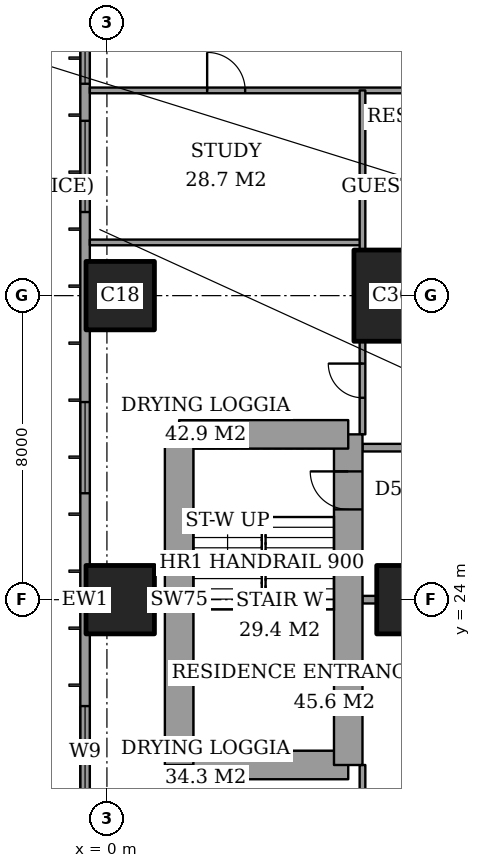
"""IFC4 building model, lengths in metres.
Left out: names, types, materials, properties, quantities, classifications, styles, units other than length and angle.
Written with IfcOpenShell. Run it as: python <this file> out.ifc"""

import sys

from ifc_helpers import new_model, si_unit, direction, frame, frame_2d, origin, origin_2d, place, context, subcontext, project, spatial, rectangle, extrude, element, fill, save


model = new_model("IFC4")
c1 = context("Model", 3, precision=1e-05, world=origin(), true_north=direction((0.0, 1.0)))
c2 = subcontext(c1, "Body", "Model", "MODEL_VIEW")
j1 = project(units=[si_unit("LENGTHUNIT", "METRE"), si_unit("PLANEANGLEUNIT", "RADIAN")], contexts=[c1])
p1 = place(None, origin())
s1 = spatial("IfcSite", under=j1, at=p1, CompositionType="ELEMENT")
p2 = place(p1, origin())
s2 = spatial("IfcBuilding", under=s1, at=p2, CompositionType="ELEMENT")
p3 = place(p2, frame((0.0, 0.0, 193.0)))
s3 = spatial("IfcBuildingStorey", under=s2, at=p3, CompositionType="ELEMENT", Elevation=193.0)
for number, where, z_axis, x_axis in (
    (1, (0.35, 24.0, 0.0), (0.0, 0.0, 1.0), (1.0, 0.0, 0.0)),
    (2, (0.35, 32.0, 0.0), (0.0, 0.0, 1.0), (1.0, 0.0, 0.0)),
    (3, (8.0, 24.0, 0.0), (0.0, 0.0, 1.0), (1.0, 0.0, 0.0)),
):
    element("IfcColumn", number, at=place(p3, frame(where, z_axis=z_axis, x_axis=x_axis)), inside=s3, PredefinedType="COLUMN", context=c2, shape_type="SweptSolid", body=[
        extrude(rectangle(XDim=1.8, YDim=1.8, at=origin_2d()), origin(), (0.0, 0.0, 1.0), 3.6),
    ])
p4 = place(p3, frame((8.0, 32.0, 0.0), z_axis=(0.0, 0.0, 1.0), x_axis=(1.0, 0.0, 0.0)))
e4 = element("IfcColumn", 4, at=p4, inside=s3, PredefinedType="COLUMN", context=c2, shape_type="SweptSolid", body=[
    extrude(rectangle(XDim=3.0, YDim=2.4, at=origin_2d()), origin(), (0.0, 0.0, 1.0), 3.6),
])
p5 = place(p3, frame((1.9, 19.65, 0.0), z_axis=(0.0, 0.0, 1.0), x_axis=(1.0, 0.0, 0.0)))
e5 = element("IfcWall", 5, at=p5, inside=s3, PredefinedType="SHEAR", context=c2, shape_type="SweptSolid", body=[
    extrude(rectangle(XDim=4.45, YDim=0.75, at=frame_2d((2.225, 0.0))), origin(), (0.0, 0.0, 1.0), 3.6),
])
p6 = place(p3, frame((6.35, 19.65, 0.0), z_axis=(0.0, 0.0, 1.0), x_axis=(0.0, 1.0, 0.0)))
e6 = element("IfcWall", 6, at=p6, inside=s3, PredefinedType="SHEAR", context=c2, shape_type="SweptSolid", body=[
    extrude(rectangle(XDim=8.7, YDim=0.75, at=frame_2d((4.35, 0.0))), origin(), (0.0, 0.0, 1.0), 3.6),
])
p7 = place(p6, frame((6.725, 0.0, 0.0)))
e7 = element("IfcOpeningElement", 7, at=p7, cuts=e6, PredefinedType="OPENING", context=c2, shape_type="SweptSolid", body=[
    extrude(rectangle(XDim=1.0, YDim=2.1, at=frame_2d((0.5, 1.05))), frame((0.0, 0.385, 0.0), z_axis=(0.0, -1.0, 0.0), x_axis=(1.0, 0.0, 0.0)), (0.0, 0.0, 1.0), 0.77),
])
p8 = place(p3, frame((6.35, 28.35, 0.0), z_axis=(0.0, 0.0, 1.0), x_axis=(-1.0, 0.0, 0.0)))
e8 = element("IfcWall", 8, at=p8, inside=s3, PredefinedType="SHEAR", context=c2, shape_type="SweptSolid", body=[
    extrude(rectangle(XDim=4.45, YDim=0.75, at=frame_2d((2.225, 0.0))), origin(), (0.0, 0.0, 1.0), 3.6),
])
p9 = place(p3, frame((1.9, 28.35, 0.0), z_axis=(0.0, 0.0, 1.0), x_axis=(0.0, -1.0, 0.0)))
e9 = element("IfcWall", 9, at=p9, inside=s3, PredefinedType="SHEAR", context=c2, shape_type="SweptSolid", body=[
    extrude(rectangle(XDim=8.7, YDim=0.75, at=frame_2d((4.35, 0.0))), origin(), (0.0, 0.0, 1.0), 3.6),
])
p10 = place(p3, frame((-0.575, 44.825, 0.0), z_axis=(0.0, 0.0, 1.0), x_axis=(0.0, -1.0, 0.0)))
e10 = element("IfcWall", 10, at=p10, inside=s3, PredefinedType="SOLIDWALL", context=c2, shape_type="SweptSolid", body=[
    extrude(rectangle(XDim=41.65, YDim=0.25, at=frame_2d((20.825, 0.0))), origin(), (0.0, 0.0, 1.0), 3.6),
])
p11 = place(p10, frame((0.825, 0.0, 0.2)))
e11 = element("IfcOpeningElement", 11, at=p11, cuts=e10, PredefinedType="OPENING", context=c2, shape_type="SweptSolid", body=[
    extrude(rectangle(XDim=2.4, YDim=2.4, at=frame_2d((1.2, 1.2))), frame((0.0, 0.135, 0.0), z_axis=(0.0, -1.0, 0.0), x_axis=(1.0, 0.0, 0.0)), (0.0, 0.0, 1.0), 0.27),
])
p12 = place(p10, frame((6.05, 0.0, 0.2)))
e12 = element("IfcOpeningElement", 12, at=p12, cuts=e10, PredefinedType="OPENING", context=c2, shape_type="SweptSolid", body=[
    extrude(rectangle(XDim=1.2, YDim=2.4, at=frame_2d((0.6, 1.2))), frame((0.0, 0.135, 0.0), z_axis=(0.0, -1.0, 0.0), x_axis=(1.0, 0.0, 0.0)), (0.0, 0.0, 1.0), 0.27),
])
p13 = place(p10, frame((8.225, 0.0, 0.2)))
e13 = element("IfcOpeningElement", 13, at=p13, cuts=e10, PredefinedType="OPENING", context=c2, shape_type="SweptSolid", body=[
    extrude(rectangle(XDim=2.4, YDim=2.4, at=frame_2d((1.2, 1.2))), frame((0.0, 0.135, 0.0), z_axis=(0.0, -1.0, 0.0), x_axis=(1.0, 0.0, 0.0)), (0.0, 0.0, 1.0), 0.27),
])
p14 = place(p10, frame((15.625, 0.0, 0.2)))
e14 = element("IfcOpeningElement", 14, at=p14, cuts=e10, PredefinedType="OPENING", context=c2, shape_type="SweptSolid", body=[
    extrude(rectangle(XDim=2.4, YDim=2.4, at=frame_2d((1.2, 1.2))), frame((0.0, 0.135, 0.0), z_axis=(0.0, -1.0, 0.0), x_axis=(1.0, 0.0, 0.0)), (0.0, 0.0, 1.0), 0.27),
])
p15 = place(p10, frame((23.625, 0.0, 0.2)))
e15 = element("IfcOpeningElement", 15, at=p15, cuts=e10, PredefinedType="OPENING", context=c2, shape_type="SweptSolid", body=[
    extrude(rectangle(XDim=2.4, YDim=2.4, at=frame_2d((1.2, 1.2))), frame((0.0, 0.135, 0.0), z_axis=(0.0, -1.0, 0.0), x_axis=(1.0, 0.0, 0.0)), (0.0, 0.0, 1.0), 0.27),
])
p16 = place(p10, frame((30.775, 0.0, 0.2)))
e16 = element("IfcOpeningElement", 16, at=p16, cuts=e10, PredefinedType="OPENING", context=c2, shape_type="SweptSolid", body=[
    extrude(rectangle(XDim=2.4, YDim=2.4, at=frame_2d((1.2, 1.2))), frame((0.0, 0.135, 0.0), z_axis=(0.0, -1.0, 0.0), x_axis=(1.0, 0.0, 0.0)), (0.0, 0.0, 1.0), 0.27),
])
p17 = place(p10, frame((34.55, 0.0, 0.2)))
e17 = element("IfcOpeningElement", 17, at=p17, cuts=e10, PredefinedType="OPENING", context=c2, shape_type="SweptSolid", body=[
    extrude(rectangle(XDim=1.2, YDim=2.4, at=frame_2d((0.6, 1.2))), frame((0.0, 0.135, 0.0), z_axis=(0.0, -1.0, 0.0), x_axis=(1.0, 0.0, 0.0)), (0.0, 0.0, 1.0), 0.27),
])
p18 = place(p10, frame((38.425, 0.0, 0.2)))
e18 = element("IfcOpeningElement", 18, at=p18, cuts=e10, PredefinedType="OPENING", context=c2, shape_type="SweptSolid", body=[
    extrude(rectangle(XDim=2.4, YDim=2.4, at=frame_2d((1.2, 1.2))), frame((0.0, 0.135, 0.0), z_axis=(0.0, -1.0, 0.0), x_axis=(1.0, 0.0, 0.0)), (0.0, 0.0, 1.0), 0.27),
])
p19 = place(p3, frame((6.725, 24.0, 0.0), z_axis=(0.0, 0.0, 1.0), x_axis=(1.0, 0.0, 0.0)))
e19 = element("IfcWall", 19, at=p19, inside=s3, PredefinedType="PARTITIONING", context=c2, shape_type="SweptSolid", body=[
    extrude(rectangle(XDim=0.375, YDim=0.2, at=frame_2d((0.188, 0.0))), origin(), (0.0, 0.0, 1.0), 3.35),
])
p20 = place(p3, frame((6.725, 28.0, 0.0), z_axis=(0.0, 0.0, 1.0), x_axis=(1.0, 0.0, 0.0)))
e20 = element("IfcWall", 20, at=p20, inside=s3, PredefinedType="PARTITIONING", context=c2, shape_type="SweptSolid", body=[
    extrude(rectangle(XDim=17.275, YDim=0.2, at=frame_2d((8.637, 0.0))), origin(), (0.0, 0.0, 1.0), 3.35),
])
p21 = place(p20, frame((6.775, 0.0, 0.0)))
e21 = element("IfcOpeningElement", 21, at=p21, cuts=e20, PredefinedType="OPENING", context=c2, shape_type="SweptSolid", body=[
    extrude(rectangle(XDim=1.2, YDim=2.4, at=frame_2d((0.6, 1.2))), frame((0.0, 0.11, 0.0), z_axis=(0.0, -1.0, 0.0), x_axis=(1.0, 0.0, 0.0)), (0.0, 0.0, 1.0), 0.22),
])
p22 = place(p3, frame((-0.45, 33.4, 0.0), z_axis=(0.0, 0.0, 1.0), x_axis=(1.0, 0.0, 0.0)))
e22 = element("IfcWall", 22, at=p22, inside=s3, PredefinedType="PARTITIONING", context=c2, shape_type="SweptSolid", body=[
    extrude(rectangle(XDim=7.175, YDim=0.15, at=frame_2d((3.587, 0.0))), origin(), (0.0, 0.0, 1.0), 3.35),
])
p23 = place(p3, frame((-0.45, 37.4, 0.0), z_axis=(0.0, 0.0, 1.0), x_axis=(1.0, 0.0, 0.0)))
e23 = element("IfcWall", 23, at=p23, inside=s3, PredefinedType="PARTITIONING", context=c2, shape_type="SweptSolid", body=[
    extrude(rectangle(XDim=25.011, YDim=0.15, at=frame_2d((12.505, 0.0))), origin(), (0.0, 0.0, 1.0), 3.35),
])
p24 = place(p23, frame((11.25, 0.0, 0.0)))
e24 = element("IfcOpeningElement", 24, at=p24, cuts=e23, PredefinedType="OPENING", context=c2, shape_type="SweptSolid", body=[
    extrude(rectangle(XDim=1.0, YDim=2.1, at=frame_2d((0.5, 1.05))), frame((0.0, 0.085, 0.0), z_axis=(0.0, -1.0, 0.0), x_axis=(1.0, 0.0, 0.0)), (0.0, 0.0, 1.0), 0.17),
])
p25 = place(p23, frame((3.087, 0.0, 0.0)))
e25 = element("IfcOpeningElement", 25, at=p25, cuts=e23, PredefinedType="OPENING", context=c2, shape_type="SweptSolid", body=[
    extrude(rectangle(XDim=1.0, YDim=2.1, at=frame_2d((0.5, 1.05))), frame((0.0, 0.085, 0.0), z_axis=(0.0, -1.0, 0.0), x_axis=(1.0, 0.0, 0.0)), (0.0, 0.0, 1.0), 0.17),
])
p26 = place(p23, frame((8.462, 0.0, 0.0)))
e26 = element("IfcOpeningElement", 26, at=p26, cuts=e23, PredefinedType="OPENING", context=c2, shape_type="SweptSolid", body=[
    extrude(rectangle(XDim=0.9, YDim=2.1, at=frame_2d((0.45, 1.05))), frame((0.0, 0.085, 0.0), z_axis=(0.0, -1.0, 0.0), x_axis=(1.0, 0.0, 0.0)), (0.0, 0.0, 1.0), 0.17),
])
p27 = place(p23, frame((15.15, 0.0, 0.0)))
e27 = element("IfcOpeningElement", 27, at=p27, cuts=e23, PredefinedType="OPENING", context=c2, shape_type="SweptSolid", body=[
    extrude(rectangle(XDim=1.0, YDim=2.1, at=frame_2d((0.5, 1.05))), frame((0.0, 0.085, 0.0), z_axis=(0.0, -1.0, 0.0), x_axis=(1.0, 0.0, 0.0)), (0.0, 0.0, 1.0), 0.17),
])
p28 = place(p23, frame((21.175, 0.0, 0.0)))
e28 = element("IfcOpeningElement", 28, at=p28, cuts=e23, PredefinedType="OPENING", context=c2, shape_type="SweptSolid", body=[
    extrude(rectangle(XDim=1.0, YDim=2.1, at=frame_2d((0.5, 1.05))), frame((0.0, 0.085, 0.0), z_axis=(0.0, -1.0, 0.0), x_axis=(1.0, 0.0, 0.0)), (0.0, 0.0, 1.0), 0.17),
])
p29 = place(p3, frame((6.725, 17.2, 0.0), z_axis=(0.0, 0.0, 1.0), x_axis=(0.0, 1.0, 0.0)))
e29 = element("IfcWall", 29, at=p29, inside=s3, PredefinedType="PARTITIONING", context=c2, shape_type="SweptSolid", body=[
    extrude(rectangle(XDim=2.45, YDim=0.15, at=frame_2d((1.225, 0.0))), origin(), (0.0, 0.0, 1.0), 3.35),
])
p30 = place(p29, frame((0.587, 0.0, 0.0)))
e30 = element("IfcOpeningElement", 30, at=p30, cuts=e29, PredefinedType="OPENING", context=c2, shape_type="SweptSolid", body=[
    extrude(rectangle(XDim=0.9, YDim=2.1, at=frame_2d((0.45, 1.05))), frame((0.0, 0.085, 0.0), z_axis=(0.0, -1.0, 0.0), x_axis=(1.0, 0.0, 0.0)), (0.0, 0.0, 1.0), 0.17),
])
p31 = place(p3, frame((6.725, 28.35, 0.0), z_axis=(0.0, 0.0, 1.0), x_axis=(0.0, 1.0, 0.0)))
e31 = element("IfcWall", 31, at=p31, inside=s3, PredefinedType="PARTITIONING", context=c2, shape_type="SweptSolid", body=[
    extrude(rectangle(XDim=2.45, YDim=0.15, at=frame_2d((1.225, 0.0))), origin(), (0.0, 0.0, 1.0), 3.35),
])
p32 = place(p31, frame((0.962, 0.0, 0.0)))
e32 = element("IfcOpeningElement", 32, at=p32, cuts=e31, PredefinedType="OPENING", context=c2, shape_type="SweptSolid", body=[
    extrude(rectangle(XDim=0.9, YDim=2.1, at=frame_2d((0.45, 1.05))), frame((0.0, 0.085, 0.0), z_axis=(0.0, -1.0, 0.0), x_axis=(1.0, 0.0, 0.0)), (0.0, 0.0, 1.0), 0.17),
])
p33 = place(p3, frame((6.725, 33.2, 0.0), z_axis=(0.0, 0.0, 1.0), x_axis=(0.0, 1.0, 0.0)))
e33 = element("IfcWall", 33, at=p33, inside=s3, PredefinedType="PARTITIONING", context=c2, shape_type="SweptSolid", body=[
    extrude(rectangle(XDim=4.2, YDim=0.15, at=frame_2d((2.1, 0.0))), origin(), (0.0, 0.0, 1.0), 3.35),
])
p34 = place(p12, origin())
e34 = element("IfcWindow", 34, at=p34, inside=s3, PartitioningType="SINGLE_PANEL", PredefinedType="WINDOW", context=c2, shape_type="SweptSolid", body=[
    extrude(rectangle(XDim=1.2, YDim=2.4, at=frame_2d((0.6, 1.2))), frame((0.0, 0.03, 0.0), z_axis=(0.0, -1.0, 0.0), x_axis=(1.0, 0.0, 0.0)), (0.0, 0.0, 1.0), 0.06),
])
fill(e12, e34)
p35 = place(p13, origin())
e35 = element("IfcWindow", 35, at=p35, inside=s3, PartitioningType="SINGLE_PANEL", PredefinedType="WINDOW", context=c2, shape_type="SweptSolid", body=[
    extrude(rectangle(XDim=2.4, YDim=2.4, at=frame_2d((1.2, 1.2))), frame((0.0, 0.03, 0.0), z_axis=(0.0, -1.0, 0.0), x_axis=(1.0, 0.0, 0.0)), (0.0, 0.0, 1.0), 0.06),
])
fill(e13, e35)
p36 = place(p14, origin())
e36 = element("IfcWindow", 36, at=p36, inside=s3, PartitioningType="SINGLE_PANEL", PredefinedType="WINDOW", context=c2, shape_type="SweptSolid", body=[
    extrude(rectangle(XDim=2.4, YDim=2.4, at=frame_2d((1.2, 1.2))), frame((0.0, 0.03, 0.0), z_axis=(0.0, -1.0, 0.0), x_axis=(1.0, 0.0, 0.0)), (0.0, 0.0, 1.0), 0.06),
])
fill(e14, e36)
p37 = place(p15, origin())
e37 = element("IfcWindow", 37, at=p37, inside=s3, PartitioningType="SINGLE_PANEL", PredefinedType="WINDOW", context=c2, shape_type="SweptSolid", body=[
    extrude(rectangle(XDim=2.4, YDim=2.4, at=frame_2d((1.2, 1.2))), frame((0.0, 0.03, 0.0), z_axis=(0.0, -1.0, 0.0), x_axis=(1.0, 0.0, 0.0)), (0.0, 0.0, 1.0), 0.06),
])
fill(e15, e37)
p38 = place(p25, origin())
e38 = element("IfcDoor", 38, at=p38, inside=s3, OperationType="SINGLE_SWING_RIGHT", PredefinedType="DOOR", context=c2, shape_type="SweptSolid", body=[
    extrude(rectangle(XDim=1.0, YDim=2.1, at=frame_2d((0.5, 1.05))), frame((0.0, 0.025, 0.0), z_axis=(0.0, -1.0, 0.0), x_axis=(1.0, 0.0, 0.0)), (0.0, 0.0, 1.0), 0.05),
])
fill(e25, e38)
p39 = place(p32, origin())
e39 = element("IfcDoor", 39, at=p39, inside=s3, OperationType="SINGLE_SWING_LEFT", PredefinedType="DOOR", context=c2, shape_type="SweptSolid", body=[
    extrude(rectangle(XDim=0.9, YDim=2.1, at=frame_2d((0.45, 1.05))), frame((0.0, 0.025, 0.0), z_axis=(0.0, -1.0, 0.0), x_axis=(1.0, 0.0, 0.0)), (0.0, 0.0, 1.0), 0.05),
])
fill(e32, e39)
p40 = place(p7, origin())
e40 = element("IfcDoor", 40, at=p40, inside=s3, OperationType="SINGLE_SWING_LEFT", PredefinedType="DOOR", context=c2, shape_type="SweptSolid", body=[
    extrude(rectangle(XDim=1.0, YDim=2.1, at=frame_2d((0.5, 1.05))), frame((0.0, 0.025, 0.0), z_axis=(0.0, -1.0, 0.0), x_axis=(1.0, 0.0, 0.0)), (0.0, 0.0, 1.0), 0.05),
])
fill(e7, e40)
save(model, sys.argv[1])
